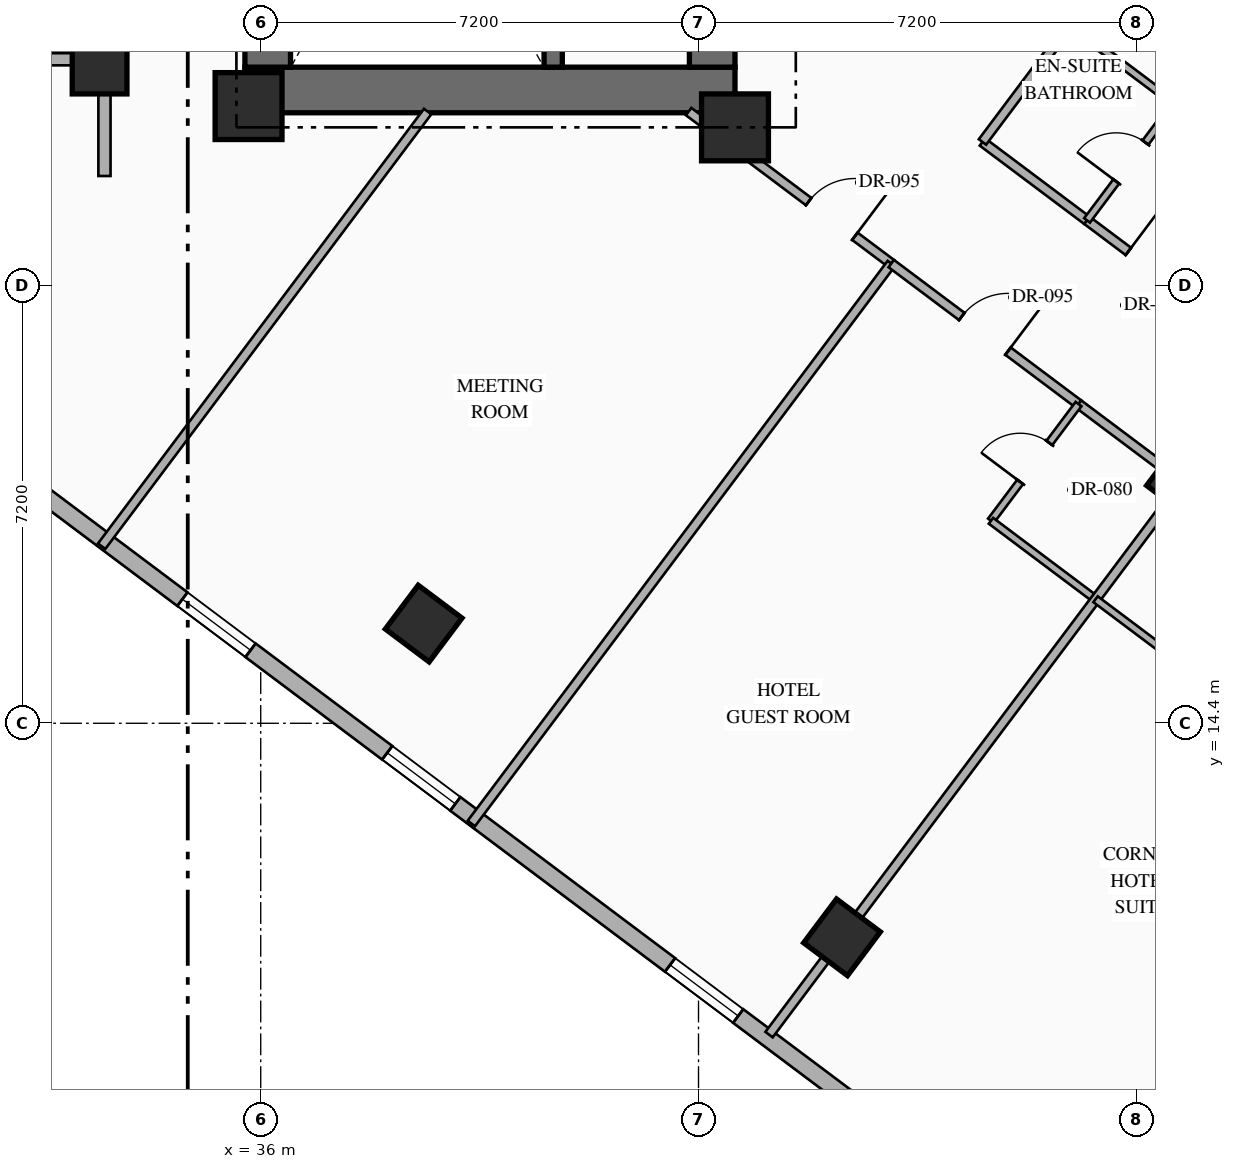
"""IFC4 building model, lengths in metres.
Left out: names, types, materials, properties, quantities, classifications, styles, units other than length and angle.
Written with IfcOpenShell. Run it as: python <this file> out.ifc"""

import sys

from ifc_helpers import new_model, si_unit, direction, frame, frame_2d, origin, origin_2d, place, context, subcontext, project, spatial, rectangle, hollow_rectangle, extrude, element, fill, save


model = new_model("IFC4")
c1 = context("Model", 3, precision=1e-05, world=origin(), true_north=direction((0.0, 1.0)))
c2 = subcontext(c1, "Body", "Model", "MODEL_VIEW")
j1 = project(units=[si_unit("LENGTHUNIT", "METRE"), si_unit("PLANEANGLEUNIT", "RADIAN")], contexts=[c1])
p1 = place(None, origin())
s1 = spatial("IfcSite", under=j1, at=p1, CompositionType="ELEMENT")
p2 = place(p1, origin())
s2 = spatial("IfcBuilding", under=s1, at=p2, CompositionType="ELEMENT")
p3 = place(p2, frame((0.0, 0.0, 81.3)))
s3 = spatial("IfcBuildingStorey", under=s2, at=p3, CompositionType="ELEMENT", Elevation=81.3)
p4 = place(p3, frame((35.74, 24.815, 0.0), z_axis=(0.0, 0.0, 1.0), x_axis=(1.0, 0.0, 0.0)))
e1 = element("IfcWall", 1, at=p4, inside=s3, PredefinedType="SHEAR", context=c2, shape_type="SweptSolid", body=[
    extrude(rectangle(XDim=8.06, YDim=0.75, at=frame_2d((4.03, 0.0))), origin(), (0.0, 0.0, 1.0), 3.35),
])
p5 = place(p3, frame((36.115, 25.19, 0.0), z_axis=(0.0, 0.0, 1.0), x_axis=(0.0, 1.0, 0.0)))
e2 = element("IfcWall", 2, at=p5, inside=s3, PredefinedType="SHEAR", context=c2, shape_type="SweptSolid", body=[
    extrude(rectangle(XDim=9.48, YDim=0.75, at=frame_2d((4.74, 0.0))), origin(), (0.0, 0.0, 1.0), 3.35),
])
p6 = place(p3, frame((43.425, 25.19, 0.0), z_axis=(0.0, 0.0, 1.0), x_axis=(0.0, 1.0, 0.0)))
e3 = element("IfcWall", 3, at=p6, inside=s3, PredefinedType="SHEAR", context=c2, shape_type="SweptSolid", body=[
    extrude(rectangle(XDim=9.48, YDim=0.75, at=frame_2d((4.74, 0.0))), origin(), (0.0, 0.0, 1.0), 3.35),
])
p7 = place(p6, frame((0.66, 0.0, 0.0)))
e4 = element("IfcOpeningElement", 4, at=p7, cuts=e3, PredefinedType="OPENING", context=c2, shape_type="SweptSolid", body=[
    extrude(rectangle(XDim=0.85, YDim=2.08, at=frame_2d((0.425, 1.04))), frame((0.0, 0.385, 0.0), z_axis=(0.0, -1.0, 0.0), x_axis=(1.0, 0.0, 0.0)), (0.0, 0.0, 1.0), 0.77),
])
p8 = place(p6, frame((2.86, 0.0, 0.0)))
e5 = element("IfcOpeningElement", 5, at=p8, cuts=e3, PredefinedType="OPENING", context=c2, shape_type="SweptSolid", body=[
    extrude(rectangle(XDim=0.85, YDim=2.08, at=frame_2d((0.425, 1.04))), frame((0.0, 0.385, 0.0), z_axis=(0.0, -1.0, 0.0), x_axis=(1.0, 0.0, 0.0)), (0.0, 0.0, 1.0), 0.77),
])
p9 = place(p6, frame((5.01, 0.0, 0.0)))
e6 = element("IfcOpeningElement", 6, at=p9, cuts=e3, PredefinedType="OPENING", context=c2, shape_type="SweptSolid", body=[
    extrude(rectangle(XDim=0.85, YDim=2.08, at=frame_2d((0.425, 1.04))), frame((0.0, 0.385, 0.0), z_axis=(0.0, -1.0, 0.0), x_axis=(1.0, 0.0, 0.0)), (0.0, 0.0, 1.0), 0.77),
])
p10 = place(p3, frame((40.81, 25.19, 0.0), z_axis=(0.0, 0.0, 1.0), x_axis=(0.0, 1.0, 0.0)))
e7 = element("IfcWall", 7, at=p10, inside=s3, PredefinedType="SHEAR", context=c2, shape_type="SweptSolid", body=[
    extrude(rectangle(XDim=9.48, YDim=0.3, at=frame_2d((4.74, 0.0))), origin(), (0.0, 0.0, 1.0), 3.35),
])
for number, where, z_axis, x_axis in (
    (8, (35.8, 24.55, 0.0), (0.0, 0.0, 1.0), (1.0, 0.0, 0.0)),
    (9, (43.8, 24.2, 0.0), (0.0, 0.0, 1.0), (1.0, 0.0, 0.0)),
):
    element("IfcColumn", number, at=place(p3, frame(where, z_axis=z_axis, x_axis=x_axis)), inside=s3, PredefinedType="COLUMN", context=c2, shape_type="SweptSolid", body=[
        extrude(rectangle(XDim=1.1, YDim=1.1, at=origin_2d()), origin(), (0.0, 0.0, 1.0), 3.35),
    ])
for number, where, z_axis, x_axis in (
    (10, (33.35, 25.2, 0.0), (0.0, 0.0, 1.0), (1.0, 0.0, 0.0)),
    (11, (38.68, 16.04, 0.0), (0.0, 0.0, 1.0), (0.8, -0.6, 0.0)),
    (12, (45.56, 10.88, 0.0), (0.0, 0.0, 1.0), (0.8, -0.6, 0.0)),
    (13, (51.2, 18.4, 0.0), (0.0, 0.0, 1.0), (0.8, -0.6, 0.0)),
):
    element("IfcColumn", number, at=place(p3, frame(where, z_axis=z_axis, x_axis=x_axis)), inside=s3, PredefinedType="COLUMN", context=c2, shape_type="SweptSolid", body=[
        extrude(hollow_rectangle(XDim=0.9, YDim=0.9, WallThickness=0.036, at=origin_2d()), origin(), (0.0, 0.0, 1.0), 3.35),
    ])
p11 = place(p3, frame((44.86, 40.73, 0.0), z_axis=(0.0, 0.0, 1.0), x_axis=(0.800006902154, -0.599990797017, 0.0)))
e14 = element("IfcWall", 14, at=p11, inside=s3, PredefinedType="STANDARD", context=c2, shape_type="SweptSolid", body=[
    extrude(rectangle(XDim=29.712, YDim=0.28, at=frame_2d((14.856, 0.0))), origin(), (0.0, 0.0, 1.0), 3.13),
])
p12 = place(p11, frame((14.249, 0.0, 0.0)))
e15 = element("IfcOpeningElement", 15, at=p12, cuts=e14, PredefinedType="OPENING", context=c2, shape_type="SweptSolid", body=[
    extrude(rectangle(XDim=1.1, YDim=2.2, at=frame_2d((0.55, 1.1))), frame((0.0, 0.15, 0.0), z_axis=(0.0, -1.0, 0.0), x_axis=(1.0, 0.0, 0.0)), (0.0, 0.0, 1.0), 0.3),
])
p13 = place(p11, frame((1.612, 0.0, 0.85)))
e16 = element("IfcOpeningElement", 16, at=p13, cuts=e14, PredefinedType="OPENING", context=c2, shape_type="SweptSolid", body=[
    extrude(rectangle(XDim=1.4, YDim=1.8, at=frame_2d((0.7, 0.9))), frame((0.0, 0.15, 0.0), z_axis=(0.0, -1.0, 0.0), x_axis=(1.0, 0.0, 0.0)), (0.0, 0.0, 1.0), 0.3),
])
p14 = place(p11, frame((5.667, 0.0, 0.85)))
e17 = element("IfcOpeningElement", 17, at=p14, cuts=e14, PredefinedType="OPENING", context=c2, shape_type="SweptSolid", body=[
    extrude(rectangle(XDim=1.4, YDim=1.8, at=frame_2d((0.7, 0.9))), frame((0.0, 0.15, 0.0), z_axis=(0.0, -1.0, 0.0), x_axis=(1.0, 0.0, 0.0)), (0.0, 0.0, 1.0), 0.3),
])
p15 = place(p11, frame((9.912, 0.0, 0.85)))
e18 = element("IfcOpeningElement", 18, at=p15, cuts=e14, PredefinedType="OPENING", context=c2, shape_type="SweptSolid", body=[
    extrude(rectangle(XDim=1.4, YDim=1.8, at=frame_2d((0.7, 0.9))), frame((0.0, 0.15, 0.0), z_axis=(0.0, -1.0, 0.0), x_axis=(1.0, 0.0, 0.0)), (0.0, 0.0, 1.0), 0.3),
])
p16 = place(p11, frame((19.528, 0.0, 0.85)))
e19 = element("IfcOpeningElement", 19, at=p16, cuts=e14, PredefinedType="OPENING", context=c2, shape_type="SweptSolid", body=[
    extrude(rectangle(XDim=1.4, YDim=1.8, at=frame_2d((0.7, 0.9))), frame((0.0, 0.15, 0.0), z_axis=(0.0, -1.0, 0.0), x_axis=(1.0, 0.0, 0.0)), (0.0, 0.0, 1.0), 0.3),
])
p17 = place(p11, frame((23.451, 0.0, 0.85)))
e20 = element("IfcOpeningElement", 20, at=p17, cuts=e14, PredefinedType="OPENING", context=c2, shape_type="SweptSolid", body=[
    extrude(rectangle(XDim=1.4, YDim=1.8, at=frame_2d((0.7, 0.9))), frame((0.0, 0.15, 0.0), z_axis=(0.0, -1.0, 0.0), x_axis=(1.0, 0.0, 0.0)), (0.0, 0.0, 1.0), 0.3),
])
p18 = place(p11, frame((27.852, 0.0, 0.85)))
e21 = element("IfcOpeningElement", 21, at=p18, cuts=e14, PredefinedType="OPENING", context=c2, shape_type="SweptSolid", body=[
    extrude(rectangle(XDim=1.4, YDim=1.8, at=frame_2d((0.7, 0.9))), frame((0.0, 0.15, 0.0), z_axis=(0.0, -1.0, 0.0), x_axis=(1.0, 0.0, 0.0)), (0.0, 0.0, 1.0), 0.3),
])
p19 = place(p3, frame((53.318, 2.487, 0.0), z_axis=(0.0, 0.0, 1.0), x_axis=(-0.800004174678, 0.599994433723, 0.0)))
e22 = element("IfcWall", 22, at=p19, inside=s3, PredefinedType="STANDARD", context=c2, shape_type="SweptSolid", body=[
    extrude(rectangle(XDim=35.089, YDim=0.28, at=frame_2d((17.544, 0.0))), origin(), (0.0, 0.0, 1.0), 3.13),
])
p20 = place(p19, frame((1.931, 0.0, 0.85)))
e23 = element("IfcOpeningElement", 23, at=p20, cuts=e22, PredefinedType="OPENING", context=c2, shape_type="SweptSolid", body=[
    extrude(rectangle(XDim=1.4, YDim=1.8, at=frame_2d((0.7, 0.9))), frame((0.0, 0.15, 0.0), z_axis=(0.0, -1.0, 0.0), x_axis=(1.0, 0.0, 0.0)), (0.0, 0.0, 1.0), 0.3),
])
p21 = place(p19, frame((6.819, 0.0, 0.85)))
e24 = element("IfcOpeningElement", 24, at=p21, cuts=e22, PredefinedType="OPENING", context=c2, shape_type="SweptSolid", body=[
    extrude(rectangle(XDim=1.4, YDim=1.8, at=frame_2d((0.7, 0.9))), frame((0.0, 0.15, 0.0), z_axis=(0.0, -1.0, 0.0), x_axis=(1.0, 0.0, 0.0)), (0.0, 0.0, 1.0), 0.3),
])
p22 = place(p19, frame((11.832, 0.0, 0.85)))
e25 = element("IfcOpeningElement", 25, at=p22, cuts=e22, PredefinedType="OPENING", context=c2, shape_type="SweptSolid", body=[
    extrude(rectangle(XDim=1.4, YDim=1.8, at=frame_2d((0.7, 0.9))), frame((0.0, 0.15, 0.0), z_axis=(0.0, -1.0, 0.0), x_axis=(1.0, 0.0, 0.0)), (0.0, 0.0, 1.0), 0.3),
])
p23 = place(p19, frame((17.647, 0.0, 0.85)))
e26 = element("IfcOpeningElement", 26, at=p23, cuts=e22, PredefinedType="OPENING", context=c2, shape_type="SweptSolid", body=[
    extrude(rectangle(XDim=1.4, YDim=1.8, at=frame_2d((0.7, 0.9))), frame((0.0, 0.15, 0.0), z_axis=(0.0, -1.0, 0.0), x_axis=(1.0, 0.0, 0.0)), (0.0, 0.0, 1.0), 0.3),
])
p24 = place(p19, frame((21.857, 0.0, 0.85)))
e27 = element("IfcOpeningElement", 27, at=p24, cuts=e22, PredefinedType="OPENING", context=c2, shape_type="SweptSolid", body=[
    extrude(rectangle(XDim=1.4, YDim=1.8, at=frame_2d((0.7, 0.9))), frame((0.0, 0.15, 0.0), z_axis=(0.0, -1.0, 0.0), x_axis=(1.0, 0.0, 0.0)), (0.0, 0.0, 1.0), 0.3),
])
p25 = place(p19, frame((26.87, 0.0, 0.85)))
e28 = element("IfcOpeningElement", 28, at=p25, cuts=e22, PredefinedType="OPENING", context=c2, shape_type="SweptSolid", body=[
    extrude(rectangle(XDim=1.4, YDim=1.8, at=frame_2d((0.7, 0.9))), frame((0.0, 0.15, 0.0), z_axis=(0.0, -1.0, 0.0), x_axis=(1.0, 0.0, 0.0)), (0.0, 0.0, 1.0), 0.3),
])
p26 = place(p19, frame((31.757, 0.0, 0.85)))
e29 = element("IfcOpeningElement", 29, at=p26, cuts=e22, PredefinedType="OPENING", context=c2, shape_type="SweptSolid", body=[
    extrude(rectangle(XDim=1.4, YDim=1.8, at=frame_2d((0.7, 0.9))), frame((0.0, 0.15, 0.0), z_axis=(0.0, -1.0, 0.0), x_axis=(1.0, 0.0, 0.0)), (0.0, 0.0, 1.0), 0.3),
])
p27 = place(p3, frame((33.43, 23.4, 0.0), z_axis=(0.0, 0.0, 1.0), x_axis=(0.0, 1.0, 0.0)))
e30 = element("IfcWall", 30, at=p27, inside=s3, PredefinedType="STANDARD", context=c2, shape_type="SweptSolid", body=[
    extrude(rectangle(XDim=4.08, YDim=0.2, at=frame_2d((2.04, 0.0))), origin(), (0.0, 0.0, 1.0), 2.425),
])
p28 = place(p3, frame((25.55, 25.32, 0.0), z_axis=(0.0, 0.0, 1.0), x_axis=(1.0, 0.0, 0.0)))
e31 = element("IfcWall", 31, at=p28, inside=s3, PredefinedType="STANDARD", context=c2, shape_type="SweptSolid", body=[
    extrude(rectangle(XDim=7.88, YDim=0.2, at=frame_2d((3.94, 0.0))), origin(), (0.0, 0.0, 1.0), 2.525),
])
p29 = place(p3, frame((43.037, 24.46, 0.0), z_axis=(0.0, 0.0, 1.0), x_axis=(0.799971872363, -0.600037501685, 0.0)))
e32 = element("IfcWall", 32, at=p29, inside=s3, PredefinedType="PARTITIONING", context=c2, shape_type="SweptSolid", body=[
    extrude(rectangle(XDim=4.167, YDim=0.15, at=frame_2d((2.083, 0.0))), origin(), (0.0, 0.0, 1.0), 2.425),
])
p30 = place(p29, frame((2.468, 0.0, 0.0)))
e33 = element("IfcOpeningElement", 33, at=p30, cuts=e32, PredefinedType="OPENING", context=c2, shape_type="SweptSolid", body=[
    extrude(rectangle(XDim=0.95, YDim=2.15, at=frame_2d((0.475, 1.075))), frame((0.0, 0.085, 0.0), z_axis=(0.0, -1.0, 0.0), x_axis=(1.0, 0.0, 0.0)), (0.0, 0.0, 1.0), 0.17),
])
p31 = place(p3, frame((33.384, 17.312, 0.0), z_axis=(0.0, 0.0, 1.0), x_axis=(0.600008743659, 0.799993442181, 0.0)))
e34 = element("IfcWall", 34, at=p31, inside=s3, PredefinedType="PARTITIONING", context=c2, shape_type="SweptSolid", body=[
    extrude(rectangle(XDim=8.935, YDim=0.15, at=frame_2d((4.468, 0.0))), origin(), (0.0, 0.0, 1.0), 3.13),
])
p32 = place(p3, frame((39.464, 12.752, 0.0), z_axis=(0.0, 0.0, 1.0), x_axis=(0.6, 0.8, 0.0)))
e35 = element("IfcWall", 35, at=p32, inside=s3, PredefinedType="PARTITIONING", context=c2, shape_type="SweptSolid", body=[
    extrude(rectangle(XDim=11.51, YDim=0.15, at=frame_2d((5.755, 0.0))), origin(), (0.0, 0.0, 1.0), 3.13),
])
p33 = place(p3, frame((47.87, 23.96, 0.0), z_axis=(0.0, 0.0, 1.0), x_axis=(0.79998637334, -0.60001816845, 0.0)))
e36 = element("IfcWall", 36, at=p33, inside=s3, PredefinedType="PARTITIONING", context=c2, shape_type="SweptSolid", body=[
    extrude(rectangle(XDim=2.15, YDim=0.15, at=frame_2d((1.075, 0.0))), origin(), (0.0, 0.0, 1.0), 2.775),
])
p34 = place(p3, frame((49.59, 22.67, 0.0), z_axis=(0.0, 0.0, 1.0), x_axis=(0.800011056104, -0.599985258246, 0.0)))
e37 = element("IfcWall", 37, at=p34, inside=s3, PredefinedType="PARTITIONING", context=c2, shape_type="SweptSolid", body=[
    extrude(rectangle(XDim=2.65, YDim=0.15, at=frame_2d((1.325, 0.0))), origin(), (0.0, 0.0, 1.0), 2.775),
])
p35 = place(p34, frame((0.85, 0.0, 0.0)))
e38 = element("IfcOpeningElement", 38, at=p35, cuts=e37, PredefinedType="OPENING", context=c2, shape_type="SweptSolid", body=[
    extrude(rectangle(XDim=0.95, YDim=2.15, at=frame_2d((0.475, 1.075))), frame((0.0, 0.085, 0.0), z_axis=(0.0, -1.0, 0.0), x_axis=(1.0, 0.0, 0.0)), (0.0, 0.0, 1.0), 0.17),
])
p36 = place(p3, frame((49.59, 22.67, 0.0), z_axis=(0.0, 0.0, 1.0), x_axis=(0.599951172744, 0.800036618114, 0.0)))
e39 = element("IfcWall", 39, at=p36, inside=s3, PredefinedType="PARTITIONING", context=c2, shape_type="SweptSolid", body=[
    extrude(rectangle(XDim=2.4, YDim=0.12, at=frame_2d((1.2, 0.0))), origin(), (0.0, 0.0, 1.0), 3.13),
])
p37 = place(p36, frame((0.8, 0.0, 0.0)))
e40 = element("IfcOpeningElement", 40, at=p37, cuts=e39, PredefinedType="OPENING", context=c2, shape_type="SweptSolid", body=[
    extrude(rectangle(XDim=0.8, YDim=2.06, at=frame_2d((0.4, 1.03))), frame((0.0, 0.07, 0.0), z_axis=(0.0, -1.0, 0.0), x_axis=(1.0, 0.0, 0.0)), (0.0, 0.0, 1.0), 0.14),
])
p38 = place(p3, frame((49.31, 25.88, 0.0), z_axis=(0.0, 0.0, 1.0), x_axis=(0.800040880289, -0.59994548908, 0.0)))
e41 = element("IfcWall", 41, at=p38, inside=s3, PredefinedType="PARTITIONING", context=c2, shape_type="SweptSolid", body=[
    extrude(rectangle(XDim=2.15, YDim=0.12, at=frame_2d((1.075, 0.0))), origin(), (0.0, 0.0, 1.0), 3.13),
])
p39 = place(p3, frame((47.87, 23.96, 0.0), z_axis=(0.0, 0.0, 1.0), x_axis=(0.599996617946, 0.80000253653, 0.0)))
e42 = element("IfcWall", 42, at=p39, inside=s3, PredefinedType="PARTITIONING", context=c2, shape_type="SweptSolid", body=[
    extrude(rectangle(XDim=11.55, YDim=0.15, at=frame_2d((5.775, 0.0))), origin(), (0.0, 0.0, 1.0), 3.13),
])
p40 = place(p3, frame((46.37, 21.96, 0.0), z_axis=(0.0, 0.0, 1.0), x_axis=(0.799977170108, -0.600030438649, 0.0)))
e43 = element("IfcWall", 43, at=p40, inside=s3, PredefinedType="PARTITIONING", context=c2, shape_type="SweptSolid", body=[
    extrude(rectangle(XDim=3.85, YDim=0.15, at=frame_2d((1.925, 0.0))), origin(), (0.0, 0.0, 1.0), 2.425),
])
p41 = place(p40, frame((1.45, 0.0, 0.0)))
e44 = element("IfcOpeningElement", 44, at=p41, cuts=e43, PredefinedType="OPENING", context=c2, shape_type="SweptSolid", body=[
    extrude(rectangle(XDim=0.95, YDim=2.15, at=frame_2d((0.475, 1.075))), frame((0.0, 0.085, 0.0), z_axis=(0.0, -1.0, 0.0), x_axis=(1.0, 0.0, 0.0)), (0.0, 0.0, 1.0), 0.17),
])
p42 = place(p3, frame((49.45, 19.65, 0.0), z_axis=(0.0, 0.0, 1.0), x_axis=(0.800040880289, -0.59994548908, 0.0)))
e45 = element("IfcWall", 45, at=p42, inside=s3, PredefinedType="PARTITIONING", context=c2, shape_type="SweptSolid", body=[
    extrude(rectangle(XDim=2.15, YDim=0.15, at=frame_2d((1.075, 0.0))), origin(), (0.0, 0.0, 1.0), 2.425),
])
p43 = place(p3, frame((48.01, 17.73, 0.0), z_axis=(0.0, 0.0, 1.0), x_axis=(0.6, 0.8, 0.0)))
e46 = element("IfcWall", 46, at=p43, inside=s3, PredefinedType="PARTITIONING", context=c2, shape_type="SweptSolid", body=[
    extrude(rectangle(XDim=2.4, YDim=0.12, at=frame_2d((1.2, 0.0))), origin(), (0.0, 0.0, 1.0), 3.13),
])
p44 = place(p43, frame((0.8, 0.0, 0.0)))
e47 = element("IfcOpeningElement", 47, at=p44, cuts=e46, PredefinedType="OPENING", context=c2, shape_type="SweptSolid", body=[
    extrude(rectangle(XDim=0.8, YDim=2.06, at=frame_2d((0.4, 1.03))), frame((0.0, 0.07, 0.0), z_axis=(0.0, -1.0, 0.0), x_axis=(1.0, 0.0, 0.0)), (0.0, 0.0, 1.0), 0.14),
])
p45 = place(p3, frame((48.01, 17.73, 0.0), z_axis=(0.0, 0.0, 1.0), x_axis=(0.79998637334, -0.60001816845, 0.0)))
e48 = element("IfcWall", 48, at=p45, inside=s3, PredefinedType="PARTITIONING", context=c2, shape_type="SweptSolid", body=[
    extrude(rectangle(XDim=2.15, YDim=0.12, at=frame_2d((1.075, 0.0))), origin(), (0.0, 0.0, 1.0), 3.13),
])
p46 = place(p3, frame((44.36, 9.28, 0.0), z_axis=(0.0, 0.0, 1.0), x_axis=(0.599986233332, 0.800010324816, 0.0)))
e49 = element("IfcWall", 49, at=p46, inside=s3, PredefinedType="PARTITIONING", context=c2, shape_type="SweptSolid", body=[
    extrude(rectangle(XDim=11.35, YDim=0.15, at=frame_2d((5.675, 0.0))), origin(), (0.0, 0.0, 1.0), 2.425),
])
p47 = place(p3, frame((49.73, 16.44, 0.0), z_axis=(0.0, 0.0, 1.0), x_axis=(0.79998637334, -0.60001816845, 0.0)))
e50 = element("IfcWall", 50, at=p47, inside=s3, PredefinedType="PARTITIONING", context=c2, shape_type="SweptSolid", body=[
    extrude(rectangle(XDim=2.15, YDim=0.12, at=frame_2d((1.075, 0.0))), origin(), (0.0, 0.0, 1.0), 3.13),
])
p48 = place(p3, frame((49.8, 5.2, 0.0), z_axis=(0.0, 0.0, 1.0), x_axis=(0.6, 0.8, 0.0)))
e51 = element("IfcWall", 51, at=p48, inside=s3, PredefinedType="PARTITIONING", context=c2, shape_type="SweptSolid", body=[
    extrude(rectangle(XDim=11.35, YDim=0.15, at=frame_2d((5.675, 0.0))), origin(), (0.0, 0.0, 1.0), 3.13),
])
p49 = place(p22, origin())
e52 = element("IfcWindow", 52, at=p49, inside=s3, PartitioningType="SINGLE_PANEL", PredefinedType="WINDOW", context=c2, shape_type="SweptSolid", body=[
    extrude(rectangle(XDim=1.4, YDim=1.8, at=frame_2d((0.7, 0.9))), frame((0.0, 0.03, 0.0), z_axis=(0.0, -1.0, 0.0), x_axis=(1.0, 0.0, 0.0)), (0.0, 0.0, 1.0), 0.06),
])
fill(e25, e52)
p50 = place(p23, origin())
e53 = element("IfcWindow", 53, at=p50, inside=s3, PartitioningType="SINGLE_PANEL", PredefinedType="WINDOW", context=c2, shape_type="SweptSolid", body=[
    extrude(rectangle(XDim=1.4, YDim=1.8, at=frame_2d((0.7, 0.9))), frame((0.0, 0.03, 0.0), z_axis=(0.0, -1.0, 0.0), x_axis=(1.0, 0.0, 0.0)), (0.0, 0.0, 1.0), 0.06),
])
fill(e26, e53)
p51 = place(p24, origin())
e54 = element("IfcWindow", 54, at=p51, inside=s3, PartitioningType="SINGLE_PANEL", PredefinedType="WINDOW", context=c2, shape_type="SweptSolid", body=[
    extrude(rectangle(XDim=1.4, YDim=1.8, at=frame_2d((0.7, 0.9))), frame((0.0, 0.03, 0.0), z_axis=(0.0, -1.0, 0.0), x_axis=(1.0, 0.0, 0.0)), (0.0, 0.0, 1.0), 0.06),
])
fill(e27, e54)
p52 = place(p30, origin())
e55 = element("IfcDoor", 55, at=p52, inside=s3, OperationType="SINGLE_SWING_RIGHT", PredefinedType="DOOR", context=c2, shape_type="SweptSolid", body=[
    extrude(rectangle(XDim=0.95, YDim=2.15, at=frame_2d((0.475, 1.075))), frame((0.0, 0.025, 0.0), z_axis=(0.0, -1.0, 0.0), x_axis=(1.0, 0.0, 0.0)), (0.0, 0.0, 1.0), 0.05),
])
fill(e33, e55)
p53 = place(p35, origin())
e56 = element("IfcDoor", 56, at=p53, inside=s3, OperationType="SINGLE_SWING_LEFT", PredefinedType="DOOR", context=c2, shape_type="SweptSolid", body=[
    extrude(rectangle(XDim=0.95, YDim=2.15, at=frame_2d((0.475, 1.075))), frame((0.0, 0.025, 0.0), z_axis=(0.0, -1.0, 0.0), x_axis=(1.0, 0.0, 0.0)), (0.0, 0.0, 1.0), 0.05),
])
fill(e38, e56)
p54 = place(p37, origin())
e57 = element("IfcDoor", 57, at=p54, inside=s3, OperationType="SINGLE_SWING_LEFT", PredefinedType="DOOR", context=c2, shape_type="SweptSolid", body=[
    extrude(rectangle(XDim=0.8, YDim=2.06, at=frame_2d((0.4, 1.03))), frame((0.0, 0.025, 0.0), z_axis=(0.0, -1.0, 0.0), x_axis=(1.0, 0.0, 0.0)), (0.0, 0.0, 1.0), 0.05),
])
fill(e40, e57)
p55 = place(p41, origin())
e58 = element("IfcDoor", 58, at=p55, inside=s3, OperationType="SINGLE_SWING_RIGHT", PredefinedType="DOOR", context=c2, shape_type="SweptSolid", body=[
    extrude(rectangle(XDim=0.95, YDim=2.15, at=frame_2d((0.475, 1.075))), frame((0.0, 0.025, 0.0), z_axis=(0.0, -1.0, 0.0), x_axis=(1.0, 0.0, 0.0)), (0.0, 0.0, 1.0), 0.05),
])
fill(e44, e58)
p56 = place(p44, origin())
e59 = element("IfcDoor", 59, at=p56, inside=s3, OperationType="SINGLE_SWING_LEFT", PredefinedType="DOOR", context=c2, shape_type="SweptSolid", body=[
    extrude(rectangle(XDim=0.8, YDim=2.06, at=frame_2d((0.4, 1.03))), frame((0.0, 0.025, 0.0), z_axis=(0.0, -1.0, 0.0), x_axis=(1.0, 0.0, 0.0)), (0.0, 0.0, 1.0), 0.05),
])
fill(e47, e59)
save(model, sys.argv[1])
